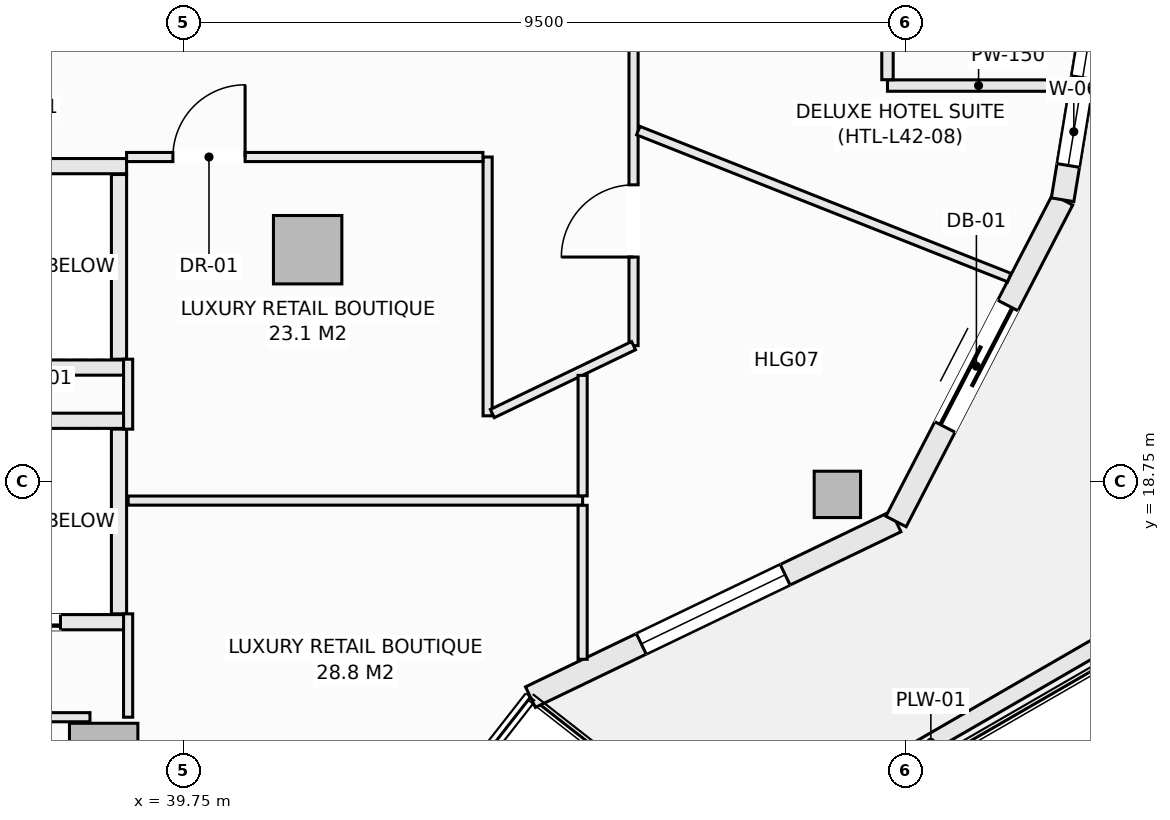
"""IFC4 building model, lengths in metres.
Left out: names, types, materials, properties, quantities, classifications, styles, units other than length and angle.
Written with IfcOpenShell. Run it as: python <this file> out.ifc"""

import sys

from ifc_helpers import new_model, si_unit, direction, frame, frame_2d, origin, origin_2d, place, context, subcontext, project, spatial, rectangle, hollow_rectangle, extrude, element, fill, save


model = new_model("IFC4")
c1 = context("Model", 3, precision=1e-05, world=origin(), true_north=direction((0.0, 1.0)))
c2 = subcontext(c1, "Body", "Model", "MODEL_VIEW")
j1 = project(units=[si_unit("LENGTHUNIT", "METRE"), si_unit("PLANEANGLEUNIT", "RADIAN")], contexts=[c1])
p1 = place(None, origin())
s1 = spatial("IfcSite", under=j1, at=p1, CompositionType="ELEMENT")
p2 = place(p1, origin())
s2 = spatial("IfcBuilding", under=s1, at=p2, CompositionType="ELEMENT")
p3 = place(p2, frame((0.0, 0.0, 163.1)))
s3 = spatial("IfcBuildingStorey", under=s2, at=p3, CompositionType="ELEMENT", Elevation=163.1)
p4 = place(p3, frame((48.352, 18.581, -0.27), z_axis=(0.0, 0.0, 1.0), x_axis=(1.0, 0.0, 0.0)))
e1 = element("IfcColumn", 1, at=p4, inside=s3, PredefinedType="COLUMN", context=c2, shape_type="SweptSolid", body=[
    extrude(hollow_rectangle(XDim=0.61, YDim=0.61, WallThickness=0.025, at=origin_2d()), origin(), (0.0, 0.0, 1.0), 3.4),
])
for number, where, z_axis, x_axis in (
    (2, (38.698, 15.121, -0.27), (0.0, 0.0, 1.0), (1.0, 0.0, 0.0)),
    (3, (41.382, 21.801, -0.27), (0.0, 0.0, 1.0), (1.0, 0.0, 0.0)),
):
    element("IfcColumn", number, at=place(p3, frame(where, z_axis=z_axis, x_axis=x_axis)), inside=s3, PredefinedType="COLUMN", context=c2, shape_type="SweptSolid", body=[
        extrude(rectangle(XDim=0.9, YDim=0.9, at=origin_2d()), origin(), (0.0, 0.0, 1.0), 3.4),
    ])
p5 = place(p3, frame((44.313, 15.914, 0.0), z_axis=(0.0, 0.0, 1.0), x_axis=(0.901353070301, 0.433085029363, 0.0)))
e4 = element("IfcWall", 4, at=p5, inside=s3, PredefinedType="SOLIDWALL", context=c2, shape_type="SweptSolid", body=[
    extrude(rectangle(XDim=5.336, YDim=0.3, at=frame_2d((2.668, 0.0))), origin(), (0.0, 0.0, 1.0), 2.653),
])
p6 = place(p5, frame((1.618, 0.0, 0.74)))
e5 = element("IfcOpeningElement", 5, at=p6, cuts=e4, PredefinedType="OPENING", context=c2, shape_type="SweptSolid", body=[
    extrude(rectangle(XDim=2.1, YDim=1.7, at=frame_2d((1.05, 0.85))), frame((0.0, 0.16, 0.0), z_axis=(0.0, -1.0, 0.0), x_axis=(1.0, 0.0, 0.0)), (0.0, 0.0, 1.0), 0.32),
])
p7 = place(p3, frame((49.123, 18.225, 0.0), z_axis=(0.0, 0.0, 1.0), x_axis=(0.459810251451, 0.888017191647, 0.0)))
e6 = element("IfcWall", 6, at=p7, inside=s3, PredefinedType="SOLIDWALL", context=c2, shape_type="SweptSolid", body=[
    extrude(rectangle(XDim=4.766, YDim=0.3, at=frame_2d((2.383, 0.0))), origin(), (0.0, 0.0, 1.0), 2.653),
])
p8 = place(p7, frame((1.4, 0.0, 0.0)))
e7 = element("IfcOpeningElement", 7, at=p8, cuts=e6, PredefinedType="OPENING", context=c2, shape_type="SweptSolid", body=[
    extrude(rectangle(XDim=1.8, YDim=2.25, at=frame_2d((0.9, 1.125))), frame((0.0, 0.16, 0.0), z_axis=(0.0, -1.0, 0.0), x_axis=(1.0, 0.0, 0.0)), (0.0, 0.0, 1.0), 0.32),
])
p9 = place(p3, frame((51.315, 22.458, 0.0), z_axis=(0.0, 0.0, 1.0), x_axis=(0.162394765401, 0.986725868806, 0.0)))
e8 = element("IfcWall", 8, at=p9, inside=s3, PredefinedType="SOLIDWALL", context=c2, shape_type="SweptSolid", body=[
    extrude(rectangle(XDim=4.603, YDim=0.3, at=frame_2d((2.302, 0.0))), origin(), (0.0, 0.0, 1.0), 2.653),
])
p10 = place(p9, frame((0.457, 0.0, 0.72)))
e9 = element("IfcOpeningElement", 9, at=p10, cuts=e8, PredefinedType="OPENING", context=c2, shape_type="SweptSolid", body=[
    extrude(rectangle(XDim=0.9, YDim=1.65, at=frame_2d((0.45, 0.825))), frame((0.0, 0.16, 0.0), z_axis=(0.0, -1.0, 0.0), x_axis=(1.0, 0.0, 0.0)), (0.0, 0.0, 1.0), 0.32),
])
p11 = place(p9, frame((1.627, 0.0, 0.72)))
e10 = element("IfcOpeningElement", 10, at=p11, cuts=e8, PredefinedType="OPENING", context=c2, shape_type="SweptSolid", body=[
    extrude(rectangle(XDim=0.9, YDim=1.65, at=frame_2d((0.45, 0.825))), frame((0.0, 0.16, 0.0), z_axis=(0.0, -1.0, 0.0), x_axis=(1.0, 0.0, 0.0)), (0.0, 0.0, 1.0), 0.32),
])
p12 = place(p3, frame((46.958, 13.805, 0.0), z_axis=(0.0, 0.0, 1.0), x_axis=(0.866058128659, 0.499943314571, 0.0)))
e11 = element("IfcWall", 11, at=p12, inside=s3, PredefinedType="PARAPET", context=c2, shape_type="SweptSolid", body=[
    extrude(rectangle(XDim=6.06, YDim=0.22, at=frame_2d((3.03, 0.0))), origin(), (0.0, 0.0, 1.0), 0.52),
])
p13 = place(p3, frame((36.75, 19.55, 0.0), z_axis=(0.0, 0.0, 1.0), x_axis=(1.0, 0.0, 0.0)))
e12 = element("IfcWall", 12, at=p13, inside=s3, PredefinedType="SOLIDWALL", context=c2, shape_type="SweptSolid", body=[
    extrude(rectangle(XDim=2.25, YDim=0.2, at=frame_2d((1.125, 0.0))), origin(), (0.0, 0.0, 1.0), 3.13),
])
p14 = place(p3, frame((36.75, 16.9, 0.0), z_axis=(0.0, 0.0, 1.0), x_axis=(1.0, 0.0, 0.0)))
e13 = element("IfcWall", 13, at=p14, inside=s3, PredefinedType="SOLIDWALL", context=c2, shape_type="SweptSolid", body=[
    extrude(rectangle(XDim=2.25, YDim=0.2, at=frame_2d((1.125, 0.0))), origin(), (0.0, 0.0, 1.0), 3.13),
])
p15 = place(p14, frame((0.28, 0.0, 0.0)))
e14 = element("IfcOpeningElement", 14, at=p15, cuts=e13, PredefinedType="OPENING", context=c2, shape_type="SweptSolid", body=[
    extrude(rectangle(XDim=1.1, YDim=2.2, at=frame_2d((0.55, 1.1))), frame((0.0, 0.11, 0.0), z_axis=(0.0, -1.0, 0.0), x_axis=(1.0, 0.0, 0.0)), (0.0, 0.0, 1.0), 0.22),
])
p16 = place(p3, frame((38.9, 17.01, 0.0), z_axis=(0.0, 0.0, 1.0), x_axis=(0.0, 1.0, 0.0)))
e15 = element("IfcWall", 15, at=p16, inside=s3, PredefinedType="SOLIDWALL", context=c2, shape_type="SweptSolid", body=[
    extrude(rectangle(XDim=2.43, YDim=0.2, at=frame_2d((1.215, 0.0))), origin(), (0.0, 0.0, 1.0), 3.13),
])
for number, where, z_axis, x_axis in (
    (16, (36.75, 22.9, 0.0), (0.0, 0.0, 1.0), (1.0, 0.0, 0.0)),
    (17, (36.75, 20.25, 0.0), (0.0, 0.0, 1.0), (1.0, 0.0, 0.0)),
):
    element("IfcWall", number, at=place(p3, frame(where, z_axis=z_axis, x_axis=x_axis)), inside=s3, PredefinedType="SOLIDWALL", context=c2, shape_type="SweptSolid", body=[
        extrude(rectangle(XDim=2.25, YDim=0.2, at=frame_2d((1.125, 0.0))), origin(), (0.0, 0.0, 1.0), 3.13),
    ])
p17 = place(p3, frame((38.9, 20.36, 0.0), z_axis=(0.0, 0.0, 1.0), x_axis=(0.0, 1.0, 0.0)))
e18 = element("IfcWall", 18, at=p17, inside=s3, PredefinedType="SOLIDWALL", context=c2, shape_type="SweptSolid", body=[
    extrude(rectangle(XDim=2.43, YDim=0.2, at=frame_2d((1.215, 0.0))), origin(), (0.0, 0.0, 1.0), 3.13),
])
p18 = place(p3, frame((49.011, 23.96, 0.0), z_axis=(0.0, 0.0, 1.0), x_axis=(1.0, 0.0, 0.0)))
e19 = element("IfcWall", 19, at=p18, inside=s3, PredefinedType="PARTITIONING", context=c2, shape_type="SweptSolid", body=[
    extrude(rectangle(XDim=2.397, YDim=0.15, at=frame_2d((1.199, 0.0))), origin(), (0.0, 0.0, 1.0), 3.13),
])
p19 = place(p3, frame((39.02, 15.65, 0.0), z_axis=(0.0, 0.0, 1.0), x_axis=(0.0, 1.0, 0.0)))
e20 = element("IfcWall", 20, at=p19, inside=s3, PredefinedType="PARTITIONING", context=c2, shape_type="SweptSolid", body=[
    extrude(rectangle(XDim=1.36, YDim=0.12, at=frame_2d((0.68, 0.0))), origin(), (0.0, 0.0, 1.0), 2.505),
])
p20 = place(p3, frame((39.02, 19.44, 0.0), z_axis=(0.0, 0.0, 1.0), x_axis=(0.0, 1.0, 0.0)))
e21 = element("IfcWall", 21, at=p20, inside=s3, PredefinedType="PARTITIONING", context=c2, shape_type="SweptSolid", body=[
    extrude(rectangle(XDim=0.92, YDim=0.12, at=frame_2d((0.46, 0.0))), origin(), (0.0, 0.0, 1.0), 3.13),
])
p21 = place(p3, frame((35.95, 15.65, 0.0), z_axis=(0.0, 0.0, 1.0), x_axis=(1.0, 0.0, 0.0)))
e22 = element("IfcWall", 22, at=p21, inside=s3, PredefinedType="PARTITIONING", context=c2, shape_type="SweptSolid", body=[
    extrude(rectangle(XDim=2.568, YDim=0.12, at=frame_2d((1.284, 0.0))), origin(), (0.0, 0.0, 1.0), 3.13),
])
p22 = place(p21, frame((0.809, 0.0, 0.0)))
e23 = element("IfcOpeningElement", 23, at=p22, cuts=e22, PredefinedType="OPENING", context=c2, shape_type="SweptSolid", body=[
    extrude(rectangle(XDim=0.95, YDim=2.1, at=frame_2d((0.475, 1.05))), frame((0.0, 0.07, 0.0), z_axis=(0.0, -1.0, 0.0), x_axis=(1.0, 0.0, 0.0)), (0.0, 0.0, 1.0), 0.14),
])
p23 = place(p3, frame((43.75, 19.615, 0.0), z_axis=(0.0, 0.0, 1.0), x_axis=(0.0, 1.0, 0.0)))
e24 = element("IfcWall", 24, at=p23, inside=s3, PredefinedType="PARTITIONING", context=c2, shape_type="SweptSolid", body=[
    extrude(rectangle(XDim=3.405, YDim=0.12, at=frame_2d((1.703, 0.0))), origin(), (0.0, 0.0, 1.0), 3.13),
])
p24 = place(p3, frame((45.67, 20.538, 0.0), z_axis=(0.0, 0.0, 1.0), x_axis=(0.0, 1.0, 0.0)))
e25 = element("IfcWall", 25, at=p24, inside=s3, PredefinedType="PARTITIONING", context=c2, shape_type="SweptSolid", body=[
    extrude(rectangle(XDim=12.924, YDim=0.12, at=frame_2d((6.462, 0.0))), origin(), (0.0, 0.0, 1.0), 3.13),
])
p25 = place(p24, frame((1.166, 0.0, 0.0)))
e26 = element("IfcOpeningElement", 26, at=p25, cuts=e25, PredefinedType="OPENING", context=c2, shape_type="SweptSolid", body=[
    extrude(rectangle(XDim=0.95, YDim=2.1, at=frame_2d((0.475, 1.05))), frame((0.0, 0.07, 0.0), z_axis=(0.0, -1.0, 0.0), x_axis=(1.0, 0.0, 0.0)), (0.0, 0.0, 1.0), 0.14),
])
p26 = place(p24, frame((4.174, 0.0, 0.0)))
e27 = element("IfcOpeningElement", 27, at=p26, cuts=e25, PredefinedType="OPENING", context=c2, shape_type="SweptSolid", body=[
    extrude(rectangle(XDim=0.95, YDim=2.1, at=frame_2d((0.475, 1.05))), frame((0.0, 0.07, 0.0), z_axis=(0.0, -1.0, 0.0), x_axis=(1.0, 0.0, 0.0)), (0.0, 0.0, 1.0), 0.14),
])
p27 = place(p24, frame((7.8, 0.0, 0.0)))
e28 = element("IfcOpeningElement", 28, at=p27, cuts=e25, PredefinedType="OPENING", context=c2, shape_type="SweptSolid", body=[
    extrude(rectangle(XDim=0.95, YDim=2.1, at=frame_2d((0.475, 1.05))), frame((0.0, 0.07, 0.0), z_axis=(0.0, -1.0, 0.0), x_axis=(1.0, 0.0, 0.0)), (0.0, 0.0, 1.0), 0.14),
])
p28 = place(p24, frame((10.808, 0.0, 0.0)))
e29 = element("IfcOpeningElement", 29, at=p28, cuts=e25, PredefinedType="OPENING", context=c2, shape_type="SweptSolid", body=[
    extrude(rectangle(XDim=0.95, YDim=2.1, at=frame_2d((0.475, 1.05))), frame((0.0, 0.07, 0.0), z_axis=(0.0, -1.0, 0.0), x_axis=(1.0, 0.0, 0.0)), (0.0, 0.0, 1.0), 0.14),
])
p29 = place(p3, frame((43.812, 19.645, 0.0), z_axis=(0.0, 0.0, 1.0), x_axis=(0.901236415331, 0.433327732417, 0.0)))
e30 = element("IfcWall", 30, at=p29, inside=s3, PredefinedType="PARTITIONING", context=c2, shape_type="SweptSolid", body=[
    extrude(rectangle(XDim=2.062, YDim=0.12, at=frame_2d((1.031, 0.0))), origin(), (0.0, 0.0, 1.0), 3.13),
])
p30 = place(p3, frame((39.0, 23.02, 0.0), z_axis=(0.0, 0.0, 1.0), x_axis=(1.0, 0.0, 0.0)))
e31 = element("IfcWall", 31, at=p30, inside=s3, PredefinedType="PARTITIONING", context=c2, shape_type="SweptSolid", body=[
    extrude(rectangle(XDim=4.688, YDim=0.12, at=frame_2d((2.344, 0.0))), origin(), (0.0, 0.0, 1.0), 3.13),
])
p31 = place(p30, frame((0.609, 0.0, 0.0)))
e32 = element("IfcOpeningElement", 32, at=p31, cuts=e31, PredefinedType="OPENING", context=c2, shape_type="SweptSolid", body=[
    extrude(rectangle(XDim=0.95, YDim=2.1, at=frame_2d((0.475, 1.05))), frame((0.0, 0.07, 0.0), z_axis=(0.0, -1.0, 0.0), x_axis=(1.0, 0.0, 0.0)), (0.0, 0.0, 1.0), 0.14),
])
p32 = place(p3, frame((39.02, 18.5, 0.0), z_axis=(0.0, 0.0, 1.0), x_axis=(1.0, 0.0, 0.0)))
e33 = element("IfcWall", 33, at=p32, inside=s3, PredefinedType="PARTITIONING", context=c2, shape_type="SweptSolid", body=[
    extrude(rectangle(XDim=5.98, YDim=0.12, at=frame_2d((2.99, 0.0))), origin(), (0.0, 0.0, 1.0), 2.812),
])
p33 = place(p3, frame((45.0, 16.413, 0.0), z_axis=(0.0, 0.0, 1.0), x_axis=(0.0, 1.0, 0.0)))
e34 = element("IfcWall", 34, at=p33, inside=s3, PredefinedType="PARTITIONING", context=c2, shape_type="SweptSolid", body=[
    extrude(rectangle(XDim=2.025, YDim=0.12, at=frame_2d((1.013, 0.0))), origin(), (0.0, 0.0, 1.0), 3.13),
])
p34 = place(p3, frame((45.0, 18.562, 0.0), z_axis=(0.0, 0.0, 1.0), x_axis=(0.0, 1.0, 0.0)))
e35 = element("IfcWall", 35, at=p34, inside=s3, PredefinedType="PARTITIONING", context=c2, shape_type="SweptSolid", body=[
    extrude(rectangle(XDim=1.585, YDim=0.12, at=frame_2d((0.792, 0.0))), origin(), (0.0, 0.0, 1.0), 3.13),
])
p35 = place(p3, frame((45.732, 23.367, 0.0), z_axis=(0.0, 0.0, 1.0), x_axis=(0.929706134606, -0.368302190158, 0.0)))
e36 = element("IfcWall", 36, at=p35, inside=s3, PredefinedType="PARTITIONING", context=c2, shape_type="SweptSolid", body=[
    extrude(rectangle(XDim=5.251, YDim=0.12, at=frame_2d((2.625, 0.0))), origin(), (0.0, 0.0, 1.0), 3.13),
])
p36 = place(p3, frame((49.011, 24.037, 0.0), z_axis=(0.0, 0.0, 1.0), x_axis=(0.0, 1.0, 0.0)))
e37 = element("IfcWall", 37, at=p36, inside=s3, PredefinedType="PARTITIONING", context=c2, shape_type="SweptSolid", body=[
    extrude(rectangle(XDim=2.436, YDim=0.15, at=frame_2d((1.218, 0.0))), origin(), (0.0, 0.0, 1.0), 3.13),
])
p37 = place(p36, frame((0.768, 0.0, 0.0)))
e38 = element("IfcOpeningElement", 38, at=p37, cuts=e37, PredefinedType="OPENING", context=c2, shape_type="SweptSolid", body=[
    extrude(rectangle(XDim=0.9, YDim=2.1, at=frame_2d((0.45, 1.05))), frame((0.0, 0.085, 0.0), z_axis=(0.0, -1.0, 0.0), x_axis=(1.0, 0.0, 0.0)), (0.0, 0.0, 1.0), 0.17),
])
p38 = place(p6, origin())
e39 = element("IfcWindow", 39, at=p38, inside=s3, PartitioningType="SINGLE_PANEL", PredefinedType="WINDOW", context=c2, shape_type="SweptSolid", body=[
    extrude(rectangle(XDim=2.1, YDim=1.7, at=frame_2d((1.05, 0.85))), frame((0.0, 0.03, 0.0), z_axis=(0.0, -1.0, 0.0), x_axis=(1.0, 0.0, 0.0)), (0.0, 0.0, 1.0), 0.06),
])
fill(e5, e39)
p39 = place(p8, frame((1.8, 0.0, 0.0), z_axis=(0.0, 0.0, 1.0), x_axis=(-1.0, 0.0, 0.0)))
e40 = element("IfcDoor", 40, at=p39, inside=s3, OperationType="SLIDING_TO_LEFT", PredefinedType="DOOR", context=c2, shape_type="SweptSolid", body=[
    extrude(rectangle(XDim=1.8, YDim=2.25, at=frame_2d((0.9, 1.125))), frame((0.0, 0.025, 0.0), z_axis=(0.0, -1.0, 0.0), x_axis=(1.0, 0.0, 0.0)), (0.0, 0.0, 1.0), 0.05),
])
fill(e7, e40)
p40 = place(p10, origin())
e41 = element("IfcWindow", 41, at=p40, inside=s3, PartitioningType="SINGLE_PANEL", PredefinedType="WINDOW", context=c2, shape_type="SweptSolid", body=[
    extrude(rectangle(XDim=0.9, YDim=1.65, at=frame_2d((0.45, 0.825))), frame((0.0, 0.03, 0.0), z_axis=(0.0, -1.0, 0.0), x_axis=(1.0, 0.0, 0.0)), (0.0, 0.0, 1.0), 0.06),
])
fill(e9, e41)
p41 = place(p15, origin())
e42 = element("IfcDoor", 42, at=p41, inside=s3, OperationType="SLIDING_TO_LEFT", PredefinedType="DOOR", context=c2, shape_type="SweptSolid", body=[
    extrude(rectangle(XDim=1.1, YDim=2.2, at=frame_2d((0.55, 1.1))), frame((0.0, 0.025, 0.0), z_axis=(0.0, -1.0, 0.0), x_axis=(1.0, 0.0, 0.0)), (0.0, 0.0, 1.0), 0.05),
])
fill(e14, e42)
p42 = place(p31, origin())
e43 = element("IfcDoor", 43, at=p42, inside=s3, OperationType="SINGLE_SWING_RIGHT", PredefinedType="DOOR", context=c2, shape_type="SweptSolid", body=[
    extrude(rectangle(XDim=0.95, YDim=2.1, at=frame_2d((0.475, 1.05))), frame((0.0, 0.025, 0.0), z_axis=(0.0, -1.0, 0.0), x_axis=(1.0, 0.0, 0.0)), (0.0, 0.0, 1.0), 0.05),
])
fill(e32, e43)
p43 = place(p25, origin())
e44 = element("IfcDoor", 44, at=p43, inside=s3, OperationType="SINGLE_SWING_LEFT", PredefinedType="DOOR", context=c2, shape_type="SweptSolid", body=[
    extrude(rectangle(XDim=0.95, YDim=2.1, at=frame_2d((0.475, 1.05))), frame((0.0, 0.025, 0.0), z_axis=(0.0, -1.0, 0.0), x_axis=(1.0, 0.0, 0.0)), (0.0, 0.0, 1.0), 0.05),
])
fill(e26, e44)
p44 = place(p11, origin())
e45 = element("IfcWindow", 45, at=p44, inside=s3, PartitioningType="SINGLE_PANEL", PredefinedType="WINDOW", context=c2, shape_type="SweptSolid", body=[
    extrude(rectangle(XDim=0.9, YDim=1.65, at=frame_2d((0.45, 0.825))), frame((0.0, 0.03, 0.0), z_axis=(0.0, -1.0, 0.0), x_axis=(1.0, 0.0, 0.0)), (0.0, 0.0, 1.0), 0.06),
])
fill(e10, e45)
save(model, sys.argv[1])
